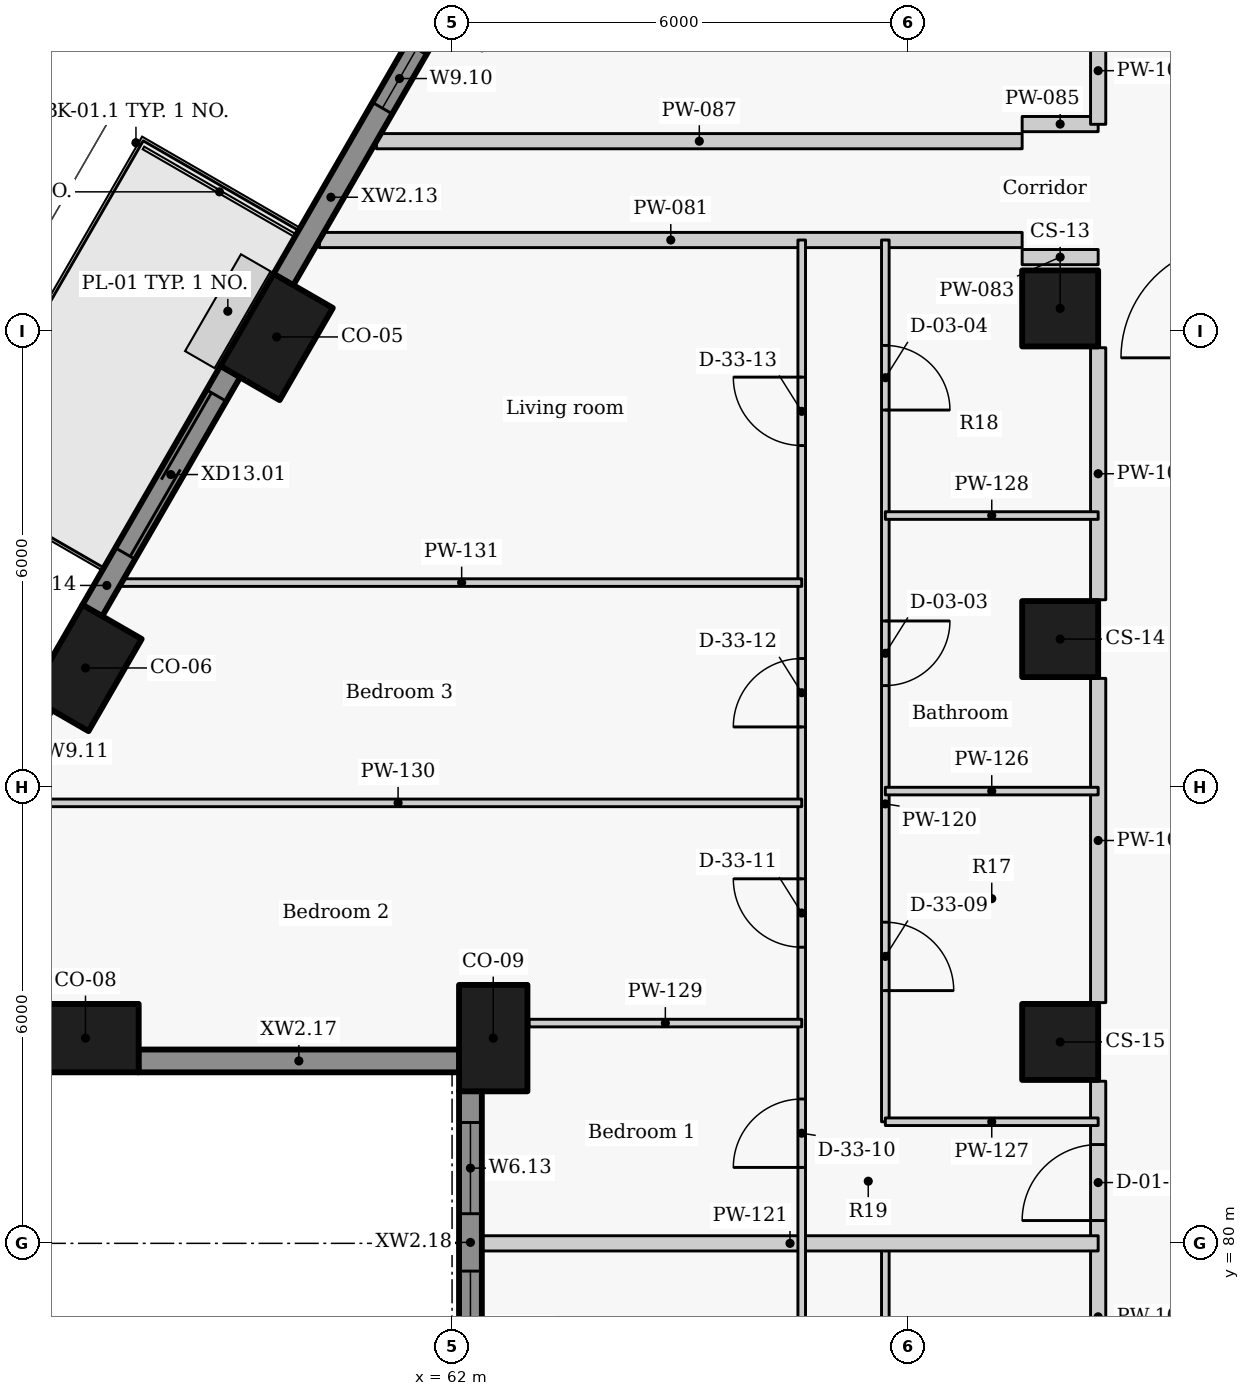
"""IFC4 building model, lengths in metres.
Left out: names, types, materials, properties, quantities, classifications, styles, units other than length and angle.
Written with IfcOpenShell. Run it as: python <this file> out.ifc"""

import sys

from ifc_helpers import new_model, si_unit, direction, frame, frame_2d, origin, origin_2d, place, context, subcontext, project, spatial, rectangle, extrude, element, fill, save


model = new_model("IFC4")
c1 = context("Model", 3, precision=1e-05, world=origin(), true_north=direction((0.0, 1.0)))
c2 = subcontext(c1, "Body", "Model", "MODEL_VIEW")
j1 = project(units=[si_unit("LENGTHUNIT", "METRE"), si_unit("PLANEANGLEUNIT", "RADIAN")], contexts=[c1])
p1 = place(None, origin())
s1 = spatial("IfcSite", under=j1, at=p1, CompositionType="ELEMENT")
p2 = place(p1, origin())
s2 = spatial("IfcBuilding", under=s1, at=p2, CompositionType="ELEMENT")
p3 = place(p2, frame((0.0, 0.0, 107.4)))
s3 = spatial("IfcBuildingStorey", under=s2, at=p3, CompositionType="ELEMENT", Elevation=107.4)
for number, where, z_axis, x_axis in (
    (1, (59.692, 91.925, 0.0), (0.0, 0.0, 1.0), (-0.5, -0.866, 0.0)),
    (2, (57.177, 87.57, 0.0), (0.0, 0.0, 1.0), (-0.5, -0.866, 0.0)),
    (3, (57.177, 82.7, 0.0), (0.0, 0.0, 1.0), (1.0, 0.0, 0.0)),
    (4, (62.542, 82.7, 0.0), (0.0, 0.0, 1.0), (0.0, -1.0, 0.0)),
):
    element("IfcColumn", number, at=place(p3, frame(where, z_axis=z_axis, x_axis=x_axis)), inside=s3, PredefinedType="COLUMN", context=c2, shape_type="SweptSolid", body=[
        extrude(rectangle(XDim=1.4, YDim=0.9, at=origin_2d()), origin(), (0.0, 0.0, 1.0), 3.3),
    ])
for number, where, z_axis, x_axis in (
    (5, (70.0, 92.3, 0.0), (0.0, 0.0, 1.0), (0.0, -1.0, 0.0)),
    (6, (70.0, 87.95, 0.0), (0.0, 0.0, 1.0), (0.0, -1.0, 0.0)),
    (7, (70.0, 82.65, 0.0), (0.0, 0.0, 1.0), (0.0, -1.0, 0.0)),
):
    element("IfcColumn", number, at=place(p3, frame(where, z_axis=z_axis, x_axis=x_axis)), inside=s3, PredefinedType="COLUMN", context=c2, shape_type="SweptSolid", body=[
        extrude(rectangle(XDim=1.0, YDim=1.0, at=origin_2d()), origin(), (0.0, 0.0, 1.0), 3.3),
    ])
p4 = place(p3, frame((61.747, 96.084, 0.0), z_axis=(0.0, 0.0, 1.0), x_axis=(-0.499957037901, -0.866050206543, 0.0)))
e8 = element("IfcWall", 8, at=p4, inside=s3, PredefinedType="SOLIDWALL", context=c2, shape_type="SweptSolid", body=[
    extrude(rectangle(XDim=3.934, YDim=0.3, at=frame_2d((1.967, 0.0))), origin(), (0.0, 0.0, 1.0), 2.425),
])
p5 = place(p4, frame((0.428, 0.0, 0.9)))
e9 = element("IfcOpeningElement", 9, at=p5, cuts=e8, PredefinedType="OPENING", context=c2, shape_type="SweptSolid", body=[
    extrude(rectangle(XDim=0.9, YDim=1.1, at=frame_2d((0.45, 0.55))), frame((0.0, 0.16, 0.0), z_axis=(0.0, -1.0, 0.0), x_axis=(1.0, 0.0, 0.0)), (0.0, 0.0, 1.0), 0.32),
])
p6 = place(p3, frame((59.084, 91.472, 0.0), z_axis=(0.0, 0.0, 1.0), x_axis=(-0.500009139881, -0.866020126807, 0.0)))
e10 = element("IfcWall", 10, at=p6, inside=s3, PredefinedType="SOLIDWALL", context=c2, shape_type="SweptSolid", body=[
    extrude(rectangle(XDim=3.637, YDim=0.3, at=frame_2d((1.818, 0.0))), origin(), (0.0, 0.0, 1.0), 2.425),
])
p7 = place(p6, frame((0.368, 0.0, 0.0)))
e11 = element("IfcOpeningElement", 11, at=p7, cuts=e10, PredefinedType="OPENING", context=c2, shape_type="SweptSolid", body=[
    extrude(rectangle(XDim=2.4, YDim=2.0, at=frame_2d((1.2, 1.0))), frame((0.0, 0.16, 0.0), z_axis=(0.0, -1.0, 0.0), x_axis=(1.0, 0.0, 0.0)), (0.0, 0.0, 1.0), 0.32),
])
p8 = place(p3, frame((56.609, 87.094, 0.0), z_axis=(0.0, 0.0, 1.0), x_axis=(-0.492456858874, -0.870336855561, 0.0)))
e12 = element("IfcWall", 12, at=p8, inside=s3, PredefinedType="SOLIDWALL", context=c2, shape_type="SweptSolid", body=[
    extrude(rectangle(XDim=5.677, YDim=0.3, at=frame_2d((2.838, 0.0))), origin(), (0.0, 0.0, 1.0), 2.425),
])
p9 = place(p8, frame((0.273, 0.0, 0.9)))
e13 = element("IfcOpeningElement", 13, at=p9, cuts=e12, PredefinedType="OPENING", context=c2, shape_type="SweptSolid", body=[
    extrude(rectangle(XDim=0.9, YDim=1.1, at=frame_2d((0.45, 0.55))), frame((0.0, 0.16, 0.0), z_axis=(0.0, -1.0, 0.0), x_axis=(1.0, 0.0, 0.0)), (0.0, 0.0, 1.0), 0.32),
])
p10 = place(p8, frame((2.311, 0.0, 0.9)))
e14 = element("IfcOpeningElement", 14, at=p10, cuts=e12, PredefinedType="OPENING", context=c2, shape_type="SweptSolid", body=[
    extrude(rectangle(XDim=1.5, YDim=1.1, at=frame_2d((0.75, 0.55))), frame((0.0, 0.16, 0.0), z_axis=(0.0, -1.0, 0.0), x_axis=(1.0, 0.0, 0.0)), (0.0, 0.0, 1.0), 0.32),
])
p11 = place(p3, frame((57.873, 82.4, 0.0), z_axis=(0.0, 0.0, 1.0), x_axis=(1.0, 0.0, 0.0)))
e15 = element("IfcWall", 15, at=p11, inside=s3, PredefinedType="SOLIDWALL", context=c2, shape_type="SweptSolid", body=[
    extrude(rectangle(XDim=4.223, YDim=0.3, at=frame_2d((2.111, 0.0))), origin(), (0.0, 0.0, 1.0), 2.425),
])
p12 = place(p3, frame((62.242, 82.004, 0.0), z_axis=(0.0, 0.0, 1.0), x_axis=(0.0, -1.0, 0.0)))
e16 = element("IfcWall", 16, at=p12, inside=s3, PredefinedType="SOLIDWALL", context=c2, shape_type="SweptSolid", body=[
    extrude(rectangle(XDim=4.258, YDim=0.3, at=frame_2d((2.129, 0.0))), origin(), (0.0, 0.0, 1.0), 2.425),
])
p13 = place(p12, frame((0.414, 0.0, 0.9)))
e17 = element("IfcOpeningElement", 17, at=p13, cuts=e16, PredefinedType="OPENING", context=c2, shape_type="SweptSolid", body=[
    extrude(rectangle(XDim=1.2, YDim=1.1, at=frame_2d((0.6, 0.55))), frame((0.0, 0.16, 0.0), z_axis=(0.0, -1.0, 0.0), x_axis=(1.0, 0.0, 0.0)), (0.0, 0.0, 1.0), 0.32),
])
p14 = place(p12, frame((2.369, 0.0, 0.9)))
e18 = element("IfcOpeningElement", 18, at=p14, cuts=e16, PredefinedType="OPENING", context=c2, shape_type="SweptSolid", body=[
    extrude(rectangle(XDim=1.5, YDim=1.1, at=frame_2d((0.75, 0.55))), frame((0.0, 0.16, 0.0), z_axis=(0.0, -1.0, 0.0), x_axis=(1.0, 0.0, 0.0)), (0.0, 0.0, 1.0), 0.32),
])
p15 = place(p3, frame((60.255, 93.2, 0.0), z_axis=(0.0, 0.0, 1.0), x_axis=(1.0, 0.0, 0.0)))
e19 = element("IfcWall", 19, at=p15, inside=s3, PredefinedType="PARTITIONING", context=c2, shape_type="SweptSolid", body=[
    extrude(rectangle(XDim=9.245, YDim=0.2, at=frame_2d((4.623, 0.0))), origin(), (0.0, 0.0, 1.0), 2.405),
])
for number, where, z_axis, x_axis in (
    (20, (69.5, 92.975, 0.0), (0.0, 0.0, 1.0), (1.0, 0.0, 0.0)),
    (21, (69.5, 94.725, 0.0), (0.0, 0.0, 1.0), (1.0, 0.0, 0.0)),
):
    element("IfcWall", number, at=place(p3, frame(where, z_axis=z_axis, x_axis=x_axis)), inside=s3, PredefinedType="PARTITIONING", context=c2, shape_type="SweptSolid", body=[
        extrude(rectangle(XDim=1.0, YDim=0.2, at=frame_2d((0.5, 0.0))), origin(), (0.0, 0.0, 1.0), 2.505),
    ])
p16 = place(p3, frame((61.005, 94.5, 0.0), z_axis=(0.0, 0.0, 1.0), x_axis=(1.0, 0.0, 0.0)))
e22 = element("IfcWall", 22, at=p16, inside=s3, PredefinedType="PARTITIONING", context=c2, shape_type="SweptSolid", body=[
    extrude(rectangle(XDim=8.495, YDim=0.2, at=frame_2d((4.248, 0.0))), origin(), (0.0, 0.0, 1.0), 2.405),
])
p17 = place(p3, frame((70.5, 77.867, 0.0), z_axis=(0.0, 0.0, 1.0), x_axis=(0.0, 1.0, 0.0)))
e23 = element("IfcWall", 23, at=p17, inside=s3, PredefinedType="PARTITIONING", context=c2, shape_type="SweptSolid", body=[
    extrude(rectangle(XDim=4.266, YDim=0.2, at=frame_2d((2.133, 0.0))), origin(), (0.0, 0.0, 1.0), 3.025),
])
p18 = place(p17, frame((2.433, 0.0, 0.0)))
e24 = element("IfcOpeningElement", 24, at=p18, cuts=e23, PredefinedType="OPENING", context=c2, shape_type="SweptSolid", body=[
    extrude(rectangle(XDim=1.0, YDim=2.1, at=frame_2d((0.5, 1.05))), frame((0.0, 0.11, 0.0), z_axis=(0.0, -1.0, 0.0), x_axis=(1.0, 0.0, 0.0)), (0.0, 0.0, 1.0), 0.22),
])
p19 = place(p3, frame((70.5, 83.167, 0.0), z_axis=(0.0, 0.0, 1.0), x_axis=(0.0, 1.0, 0.0)))
e25 = element("IfcWall", 25, at=p19, inside=s3, PredefinedType="PARTITIONING", context=c2, shape_type="SweptSolid", body=[
    extrude(rectangle(XDim=4.266, YDim=0.2, at=frame_2d((2.133, 0.0))), origin(), (0.0, 0.0, 1.0), 3.025),
])
p20 = place(p3, frame((70.5, 88.467, 0.0), z_axis=(0.0, 0.0, 1.0), x_axis=(0.0, 1.0, 0.0)))
e26 = element("IfcWall", 26, at=p20, inside=s3, PredefinedType="PARTITIONING", context=c2, shape_type="SweptSolid", body=[
    extrude(rectangle(XDim=3.316, YDim=0.2, at=frame_2d((1.658, 0.0))), origin(), (0.0, 0.0, 1.0), 3.025),
])
p21 = place(p3, frame((70.5, 94.722, 0.0), z_axis=(0.0, 0.0, 1.0), x_axis=(0.0, 1.0, 0.0)))
e27 = element("IfcWall", 27, at=p21, inside=s3, PredefinedType="PARTITIONING", context=c2, shape_type="SweptSolid", body=[
    extrude(rectangle(XDim=1.411, YDim=0.2, at=frame_2d((0.706, 0.0))), origin(), (0.0, 0.0, 1.0), 3.025),
])
p22 = place(p3, frame((67.7, 80.0, 0.0), z_axis=(0.0, 0.0, 1.0), x_axis=(0.0, -1.0, 0.0)))
e28 = element("IfcWall", 28, at=p22, inside=s3, PredefinedType="PARTITIONING", context=c2, shape_type="SweptSolid", body=[
    extrude(rectangle(XDim=9.4, YDim=0.1, at=frame_2d((4.7, 0.0))), origin(), (0.0, 0.0, 1.0), 3.025),
])
p23 = place(p22, frame((6.839, 0.0, 0.0)))
e29 = element("IfcOpeningElement", 29, at=p23, cuts=e28, PredefinedType="OPENING", context=c2, shape_type="SweptSolid", body=[
    extrude(rectangle(XDim=0.85, YDim=2.1, at=frame_2d((0.425, 1.05))), frame((0.0, 0.06, 0.0), z_axis=(0.0, -1.0, 0.0), x_axis=(1.0, 0.0, 0.0)), (0.0, 0.0, 1.0), 0.12),
])
p24 = place(p22, frame((2.114, 0.0, 0.0)))
e30 = element("IfcOpeningElement", 30, at=p24, cuts=e28, PredefinedType="OPENING", context=c2, shape_type="SweptSolid", body=[
    extrude(rectangle(XDim=0.9, YDim=2.1, at=frame_2d((0.45, 1.05))), frame((0.0, 0.06, 0.0), z_axis=(0.0, -1.0, 0.0), x_axis=(1.0, 0.0, 0.0)), (0.0, 0.0, 1.0), 0.12),
])
p25 = place(p3, frame((67.7, 93.2, 0.0), z_axis=(0.0, 0.0, 1.0), x_axis=(0.0, -1.0, 0.0)))
e31 = element("IfcWall", 31, at=p25, inside=s3, PredefinedType="PARTITIONING", context=c2, shape_type="SweptSolid", body=[
    extrude(rectangle(XDim=11.6, YDim=0.1, at=frame_2d((5.8, 0.0))), origin(), (0.0, 0.0, 1.0), 3.025),
])
p26 = place(p25, frame((8.975, 0.0, 0.0)))
e32 = element("IfcOpeningElement", 32, at=p26, cuts=e31, PredefinedType="OPENING", context=c2, shape_type="SweptSolid", body=[
    extrude(rectangle(XDim=0.9, YDim=2.1, at=frame_2d((0.45, 1.05))), frame((0.0, 0.06, 0.0), z_axis=(0.0, -1.0, 0.0), x_axis=(1.0, 0.0, 0.0)), (0.0, 0.0, 1.0), 0.12),
])
p27 = place(p25, frame((5.012, 0.0, 0.0)))
e33 = element("IfcOpeningElement", 33, at=p27, cuts=e31, PredefinedType="OPENING", context=c2, shape_type="SweptSolid", body=[
    extrude(rectangle(XDim=0.85, YDim=2.1, at=frame_2d((0.425, 1.05))), frame((0.0, 0.06, 0.0), z_axis=(0.0, -1.0, 0.0), x_axis=(1.0, 0.0, 0.0)), (0.0, 0.0, 1.0), 0.12),
])
p28 = place(p25, frame((1.387, 0.0, 0.0)))
e34 = element("IfcOpeningElement", 34, at=p28, cuts=e31, PredefinedType="OPENING", context=c2, shape_type="SweptSolid", body=[
    extrude(rectangle(XDim=0.85, YDim=2.1, at=frame_2d((0.425, 1.05))), frame((0.0, 0.06, 0.0), z_axis=(0.0, -1.0, 0.0), x_axis=(1.0, 0.0, 0.0)), (0.0, 0.0, 1.0), 0.12),
])
p29 = place(p3, frame((62.392, 80.0, 0.0), z_axis=(0.0, 0.0, 1.0), x_axis=(1.0, 0.0, 0.0)))
e35 = element("IfcWall", 35, at=p29, inside=s3, PredefinedType="PARTITIONING", context=c2, shape_type="SweptSolid", body=[
    extrude(rectangle(XDim=8.108, YDim=0.2, at=frame_2d((4.054, 0.0))), origin(), (0.0, 0.0, 1.0), 2.405),
])
p30 = place(p3, frame((66.6, 69.0, 0.0), z_axis=(0.0, 0.0, 1.0), x_axis=(0.0, 1.0, 0.0)))
e36 = element("IfcWall", 36, at=p30, inside=s3, PredefinedType="PARTITIONING", context=c2, shape_type="SweptSolid", body=[
    extrude(rectangle(XDim=24.2, YDim=0.1, at=frame_2d((12.1, 0.0))), origin(), (0.0, 0.0, 1.0), 3.025),
])
p31 = place(p30, frame((1.147, 0.0, 0.0)))
e37 = element("IfcOpeningElement", 37, at=p31, cuts=e36, PredefinedType="OPENING", context=c2, shape_type="SweptSolid", body=[
    extrude(rectangle(XDim=0.9, YDim=2.1, at=frame_2d((0.45, 1.05))), frame((0.0, 0.06, 0.0), z_axis=(0.0, -1.0, 0.0), x_axis=(1.0, 0.0, 0.0)), (0.0, 0.0, 1.0), 0.12),
])
p32 = place(p30, frame((4.34, 0.0, 0.0)))
e38 = element("IfcOpeningElement", 38, at=p32, cuts=e36, PredefinedType="OPENING", context=c2, shape_type="SweptSolid", body=[
    extrude(rectangle(XDim=0.9, YDim=2.1, at=frame_2d((0.45, 1.05))), frame((0.0, 0.06, 0.0), z_axis=(0.0, -1.0, 0.0), x_axis=(1.0, 0.0, 0.0)), (0.0, 0.0, 1.0), 0.12),
])
p33 = place(p30, frame((8.244, 0.0, 0.0)))
e39 = element("IfcOpeningElement", 39, at=p33, cuts=e36, PredefinedType="OPENING", context=c2, shape_type="SweptSolid", body=[
    extrude(rectangle(XDim=0.9, YDim=2.1, at=frame_2d((0.45, 1.05))), frame((0.0, 0.06, 0.0), z_axis=(0.0, -1.0, 0.0), x_axis=(1.0, 0.0, 0.0)), (0.0, 0.0, 1.0), 0.12),
])
p34 = place(p30, frame((11.999, 0.0, 0.0)))
e40 = element("IfcOpeningElement", 40, at=p34, cuts=e36, PredefinedType="OPENING", context=c2, shape_type="SweptSolid", body=[
    extrude(rectangle(XDim=0.9, YDim=2.1, at=frame_2d((0.45, 1.05))), frame((0.0, 0.06, 0.0), z_axis=(0.0, -1.0, 0.0), x_axis=(1.0, 0.0, 0.0)), (0.0, 0.0, 1.0), 0.12),
])
p35 = place(p30, frame((14.896, 0.0, 0.0)))
e41 = element("IfcOpeningElement", 41, at=p35, cuts=e36, PredefinedType="OPENING", context=c2, shape_type="SweptSolid", body=[
    extrude(rectangle(XDim=0.9, YDim=2.1, at=frame_2d((0.45, 1.05))), frame((0.0, 0.06, 0.0), z_axis=(0.0, -1.0, 0.0), x_axis=(1.0, 0.0, 0.0)), (0.0, 0.0, 1.0), 0.12),
])
p36 = place(p30, frame((17.794, 0.0, 0.0)))
e42 = element("IfcOpeningElement", 42, at=p36, cuts=e36, PredefinedType="OPENING", context=c2, shape_type="SweptSolid", body=[
    extrude(rectangle(XDim=0.9, YDim=2.1, at=frame_2d((0.45, 1.05))), frame((0.0, 0.06, 0.0), z_axis=(0.0, -1.0, 0.0), x_axis=(1.0, 0.0, 0.0)), (0.0, 0.0, 1.0), 0.12),
])
p37 = place(p30, frame((21.496, 0.0, 0.0)))
e43 = element("IfcOpeningElement", 43, at=p37, cuts=e36, PredefinedType="OPENING", context=c2, shape_type="SweptSolid", body=[
    extrude(rectangle(XDim=0.9, YDim=2.1, at=frame_2d((0.45, 1.05))), frame((0.0, 0.06, 0.0), z_axis=(0.0, -1.0, 0.0), x_axis=(1.0, 0.0, 0.0)), (0.0, 0.0, 1.0), 0.12),
])
for number, where, z_axis, x_axis in (
    (44, (67.7, 85.95, 0.0), (0.0, 0.0, 1.0), (1.0, 0.0, 0.0)),
    (45, (67.7, 81.6, 0.0), (0.0, 0.0, 1.0), (1.0, 0.0, 0.0)),
    (46, (67.7, 89.575, 0.0), (0.0, 0.0, 1.0), (1.0, 0.0, 0.0)),
):
    element("IfcWall", number, at=place(p3, frame(where, z_axis=z_axis, x_axis=x_axis)), inside=s3, PredefinedType="PARTITIONING", context=c2, shape_type="SweptSolid", body=[
        extrude(rectangle(XDim=2.8, YDim=0.1, at=frame_2d((1.4, 0.0))), origin(), (0.0, 0.0, 1.0), 2.505),
    ])
p38 = place(p3, frame((63.012, 82.898, 0.0), z_axis=(0.0, 0.0, 1.0), x_axis=(1.0, 0.0, 0.0)))
e47 = element("IfcWall", 47, at=p38, inside=s3, PredefinedType="PARTITIONING", context=c2, shape_type="SweptSolid", body=[
    extrude(rectangle(XDim=3.588, YDim=0.1, at=frame_2d((1.794, 0.0))), origin(), (0.0, 0.0, 1.0), 3.025),
])
p39 = place(p3, frame((55.979, 85.795, 0.0), z_axis=(0.0, 0.0, 1.0), x_axis=(1.0, 0.0, 0.0)))
e48 = element("IfcWall", 48, at=p39, inside=s3, PredefinedType="PARTITIONING", context=c2, shape_type="SweptSolid", body=[
    extrude(rectangle(XDim=10.621, YDim=0.1, at=frame_2d((5.31, 0.0))), origin(), (0.0, 0.0, 1.0), 2.405),
])
p40 = place(p3, frame((57.652, 88.693, 0.0), z_axis=(0.0, 0.0, 1.0), x_axis=(1.0, 0.0, 0.0)))
e49 = element("IfcWall", 49, at=p40, inside=s3, PredefinedType="PARTITIONING", context=c2, shape_type="SweptSolid", body=[
    extrude(rectangle(XDim=8.948, YDim=0.1, at=frame_2d((4.474, 0.0))), origin(), (0.0, 0.0, 1.0), 2.405),
])
p41 = place(p5, origin())
e50 = element("IfcWindow", 50, at=p41, inside=s3, PartitioningType="SINGLE_PANEL", PredefinedType="WINDOW", context=c2, shape_type="SweptSolid", body=[
    extrude(rectangle(XDim=0.9, YDim=1.1, at=frame_2d((0.45, 0.55))), frame((0.0, 0.03, 0.0), z_axis=(0.0, -1.0, 0.0), x_axis=(1.0, 0.0, 0.0)), (0.0, 0.0, 1.0), 0.06),
])
fill(e9, e50)
p42 = place(p7, origin())
e51 = element("IfcDoor", 51, at=p42, inside=s3, OperationType="DOUBLE_DOOR_SLIDING", PredefinedType="DOOR", context=c2, shape_type="SweptSolid", body=[
    extrude(rectangle(XDim=2.4, YDim=2.0, at=frame_2d((1.2, 1.0))), frame((0.0, 0.025, 0.0), z_axis=(0.0, -1.0, 0.0), x_axis=(1.0, 0.0, 0.0)), (0.0, 0.0, 1.0), 0.05),
])
fill(e11, e51)
p43 = place(p13, origin())
e52 = element("IfcWindow", 52, at=p43, inside=s3, PartitioningType="SINGLE_PANEL", PredefinedType="WINDOW", context=c2, shape_type="SweptSolid", body=[
    extrude(rectangle(XDim=1.2, YDim=1.1, at=frame_2d((0.6, 0.55))), frame((0.0, 0.03, 0.0), z_axis=(0.0, -1.0, 0.0), x_axis=(1.0, 0.0, 0.0)), (0.0, 0.0, 1.0), 0.06),
])
fill(e17, e52)
p44 = place(p14, origin())
e53 = element("IfcWindow", 53, at=p44, inside=s3, PartitioningType="SINGLE_PANEL", PredefinedType="WINDOW", context=c2, shape_type="SweptSolid", body=[
    extrude(rectangle(XDim=1.5, YDim=1.1, at=frame_2d((0.75, 0.55))), frame((0.0, 0.03, 0.0), z_axis=(0.0, -1.0, 0.0), x_axis=(1.0, 0.0, 0.0)), (0.0, 0.0, 1.0), 0.06),
])
fill(e18, e53)
p45 = place(p18, origin())
e54 = element("IfcDoor", 54, at=p45, inside=s3, OperationType="SINGLE_SWING_LEFT", PredefinedType="DOOR", context=c2, shape_type="SweptSolid", body=[
    extrude(rectangle(XDim=1.0, YDim=2.1, at=frame_2d((0.5, 1.05))), frame((0.0, 0.025, 0.0), z_axis=(0.0, -1.0, 0.0), x_axis=(1.0, 0.0, 0.0)), (0.0, 0.0, 1.0), 0.05),
])
fill(e24, e54)
p46 = place(p26, origin())
e55 = element("IfcDoor", 55, at=p46, inside=s3, OperationType="SINGLE_SWING_RIGHT", PredefinedType="DOOR", context=c2, shape_type="SweptSolid", body=[
    extrude(rectangle(XDim=0.9, YDim=2.1, at=frame_2d((0.45, 1.05))), frame((0.0, 0.025, 0.0), z_axis=(0.0, -1.0, 0.0), x_axis=(1.0, 0.0, 0.0)), (0.0, 0.0, 1.0), 0.05),
])
fill(e32, e55)
p47 = place(p27, origin())
e56 = element("IfcDoor", 56, at=p47, inside=s3, OperationType="SINGLE_SWING_LEFT", PredefinedType="DOOR", context=c2, shape_type="SweptSolid", body=[
    extrude(rectangle(XDim=0.85, YDim=2.1, at=frame_2d((0.425, 1.05))), frame((0.0, 0.025, 0.0), z_axis=(0.0, -1.0, 0.0), x_axis=(1.0, 0.0, 0.0)), (0.0, 0.0, 1.0), 0.05),
])
fill(e33, e56)
p48 = place(p28, origin())
e57 = element("IfcDoor", 57, at=p48, inside=s3, OperationType="SINGLE_SWING_RIGHT", PredefinedType="DOOR", context=c2, shape_type="SweptSolid", body=[
    extrude(rectangle(XDim=0.85, YDim=2.1, at=frame_2d((0.425, 1.05))), frame((0.0, 0.025, 0.0), z_axis=(0.0, -1.0, 0.0), x_axis=(1.0, 0.0, 0.0)), (0.0, 0.0, 1.0), 0.05),
])
fill(e34, e57)
p49 = place(p34, origin())
e58 = element("IfcDoor", 58, at=p49, inside=s3, OperationType="SINGLE_SWING_LEFT", PredefinedType="DOOR", context=c2, shape_type="SweptSolid", body=[
    extrude(rectangle(XDim=0.9, YDim=2.1, at=frame_2d((0.45, 1.05))), frame((0.0, 0.025, 0.0), z_axis=(0.0, -1.0, 0.0), x_axis=(1.0, 0.0, 0.0)), (0.0, 0.0, 1.0), 0.05),
])
fill(e40, e58)
p50 = place(p35, origin())
e59 = element("IfcDoor", 59, at=p50, inside=s3, OperationType="SINGLE_SWING_RIGHT", PredefinedType="DOOR", context=c2, shape_type="SweptSolid", body=[
    extrude(rectangle(XDim=0.9, YDim=2.1, at=frame_2d((0.45, 1.05))), frame((0.0, 0.025, 0.0), z_axis=(0.0, -1.0, 0.0), x_axis=(1.0, 0.0, 0.0)), (0.0, 0.0, 1.0), 0.05),
])
fill(e41, e59)
p51 = place(p36, origin())
e60 = element("IfcDoor", 60, at=p51, inside=s3, OperationType="SINGLE_SWING_LEFT", PredefinedType="DOOR", context=c2, shape_type="SweptSolid", body=[
    extrude(rectangle(XDim=0.9, YDim=2.1, at=frame_2d((0.45, 1.05))), frame((0.0, 0.025, 0.0), z_axis=(0.0, -1.0, 0.0), x_axis=(1.0, 0.0, 0.0)), (0.0, 0.0, 1.0), 0.05),
])
fill(e42, e60)
p52 = place(p37, origin())
e61 = element("IfcDoor", 61, at=p52, inside=s3, OperationType="SINGLE_SWING_RIGHT", PredefinedType="DOOR", context=c2, shape_type="SweptSolid", body=[
    extrude(rectangle(XDim=0.9, YDim=2.1, at=frame_2d((0.45, 1.05))), frame((0.0, 0.025, 0.0), z_axis=(0.0, -1.0, 0.0), x_axis=(1.0, 0.0, 0.0)), (0.0, 0.0, 1.0), 0.05),
])
fill(e43, e61)
save(model, sys.argv[1])
